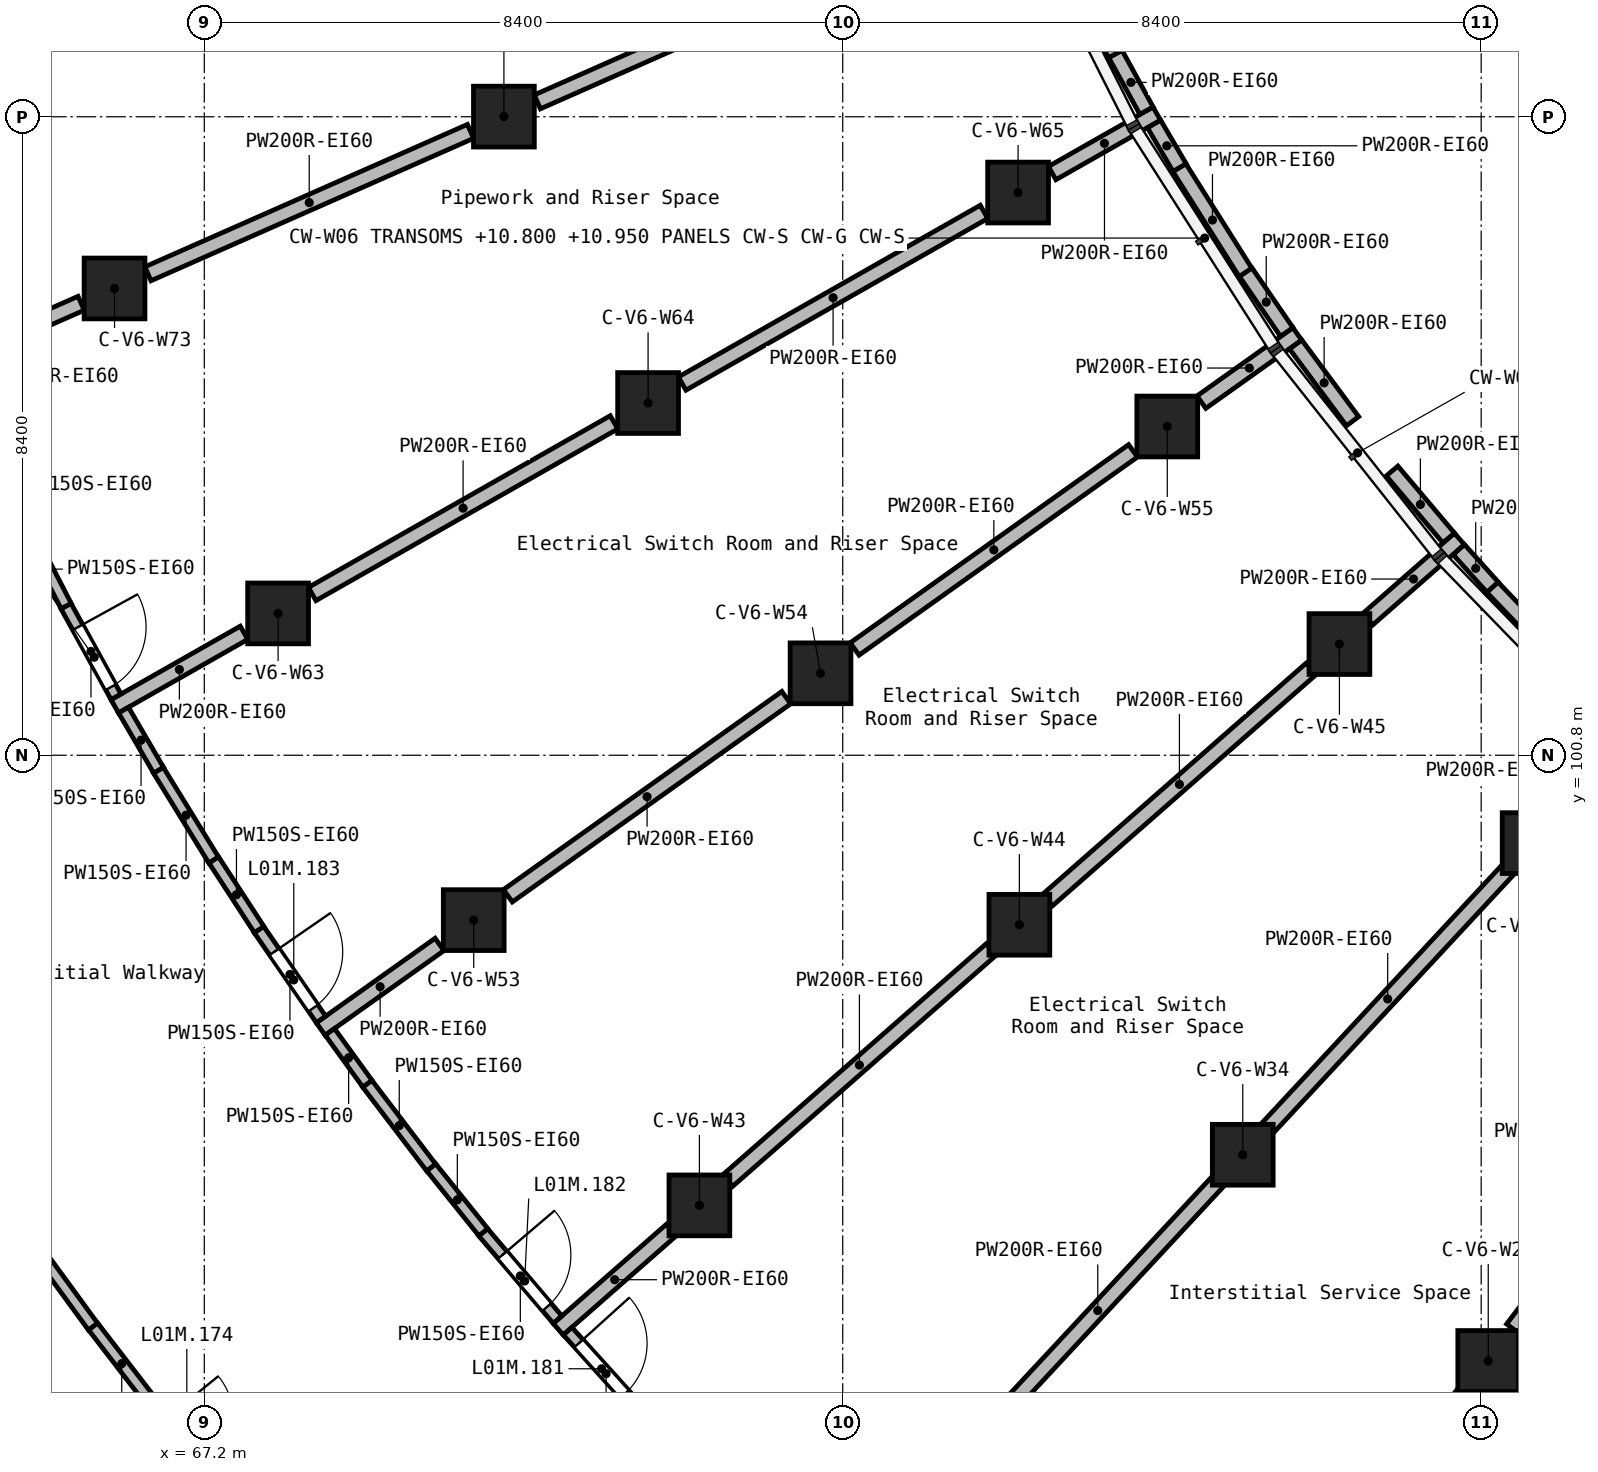
"""IFC4 building model, lengths in metres.
Left out: names, types, materials, properties, quantities, classifications, styles, units other than length and angle.
Written with IfcOpenShell. Run it as: python <this file> out.ifc"""

import sys

from ifc_helpers import new_model, si_unit, direction, frame, frame_2d, origin, origin_2d, place, context, subcontext, project, spatial, rectangle, extrude, element, fill, save


model = new_model("IFC4")
c1 = context("Model", 3, precision=1e-05, world=origin(), true_north=direction((0.0, 1.0)))
c2 = subcontext(c1, "Body", "Model", "MODEL_VIEW")
j1 = project(units=[si_unit("LENGTHUNIT", "METRE"), si_unit("PLANEANGLEUNIT", "RADIAN")], contexts=[c1])
p1 = place(None, origin())
s1 = spatial("IfcSite", under=j1, at=p1, CompositionType="ELEMENT")
p2 = place(p1, origin())
s2 = spatial("IfcBuilding", under=s1, at=p2, CompositionType="ELEMENT")
p3 = place(p2, frame((0.0, 0.0, 9.9)))
s3 = spatial("IfcBuildingStorey", under=s2, at=p3, CompositionType="ELEMENT", Elevation=9.9)
for number, where, z_axis, x_axis in (
    (1, (66.019, 106.941, 0.0), (0.0, 0.0, 1.0), (1.0, 0.0, 0.0)),
    (2, (68.171, 102.666, 0.0), (0.0, 0.0, 1.0), (1.0, 0.0, 0.0)),
    (3, (70.745, 98.631, 0.0), (0.0, 0.0, 1.0), (1.0, 0.0, 0.0)),
    (4, (71.142, 109.202, 0.0), (0.0, 0.0, 1.0), (1.0, 0.0, 0.0)),
    (5, (73.039, 105.434, 0.0), (0.0, 0.0, 1.0), (1.0, 0.0, 0.0)),
    (6, (73.714, 94.878, 0.0), (0.0, 0.0, 1.0), (1.0, 0.0, 0.0)),
    (7, (75.308, 101.878, 0.0), (0.0, 0.0, 1.0), (1.0, 0.0, 0.0)),
    (8, (77.907, 108.203, 0.0), (0.0, 0.0, 1.0), (1.0, 0.0, 0.0)),
    (9, (77.924, 98.57, 0.0), (0.0, 0.0, 1.0), (1.0, 0.0, 0.0)),
    (10, (79.87, 105.125, 0.0), (0.0, 0.0, 1.0), (1.0, 0.0, 0.0)),
    (11, (80.863, 95.544, 0.0), (0.0, 0.0, 1.0), (1.0, 0.0, 0.0)),
    (12, (82.135, 102.263, 0.0), (0.0, 0.0, 1.0), (1.0, 0.0, 0.0)),
    (13, (84.093, 92.831, 0.0), (0.0, 0.0, 1.0), (1.0, 0.0, 0.0)),
    (14, (84.677, 99.644, 0.0), (0.0, 0.0, 1.0), (1.0, 0.0, 0.0)),
):
    element("IfcColumn", number, at=place(p3, frame(where, z_axis=z_axis, x_axis=x_axis)), inside=s3, PredefinedType="COLUMN", context=c2, shape_type="SweptSolid", body=[
        extrude(rectangle(XDim=0.8, YDim=0.8, at=origin_2d()), origin(), (0.0, 0.0, 1.0), 2.7),
    ])
p4 = place(p3, frame((63.757, 105.942, 0.0), z_axis=(0.0, 0.0, 1.0), x_axis=(0.91480459559, 0.403896709429, 0.0)))
e15 = element("IfcWall", 15, at=p4, inside=s3, PredefinedType="SOLIDWALL", context=c2, shape_type="SweptSolid", body=[
    extrude(rectangle(XDim=1.992, YDim=0.2, at=frame_2d((0.996, 0.0))), origin(), (0.0, 0.0, 1.0), 2.45),
])
p5 = place(p3, frame((66.458, 107.134, 0.0), z_axis=(0.0, 0.0, 1.0), x_axis=(0.914820027479, 0.403861755213, 0.0)))
e16 = element("IfcWall", 16, at=p5, inside=s3, PredefinedType="SOLIDWALL", context=c2, shape_type="SweptSolid", body=[
    extrude(rectangle(XDim=4.639, YDim=0.2, at=frame_2d((2.32, 0.0))), origin(), (0.0, 0.0, 1.0), 2.45),
])
p6 = place(p3, frame((71.582, 109.396, 0.0), z_axis=(0.0, 0.0, 1.0), x_axis=(0.914834914902, 0.40382803082, 0.0)))
e17 = element("IfcWall", 17, at=p6, inside=s3, PredefinedType="SOLIDWALL", context=c2, shape_type="SweptSolid", body=[
    extrude(rectangle(XDim=4.64, YDim=0.2, at=frame_2d((2.32, 0.0))), origin(), (0.0, 0.0, 1.0), 2.45),
])
p7 = place(p3, frame((66.022, 101.444, 0.0), z_axis=(0.0, 0.0, 1.0), x_axis=(0.869270144925, 0.494337349532, 0.0)))
e18 = element("IfcWall", 18, at=p7, inside=s3, PredefinedType="SOLIDWALL", context=c2, shape_type="SweptSolid", body=[
    extrude(rectangle(XDim=1.957, YDim=0.2, at=frame_2d((0.979, 0.0))), origin(), (0.0, 0.0, 1.0), 2.45),
])
p8 = place(p3, frame((68.619, 102.921, 0.0), z_axis=(0.0, 0.0, 1.0), x_axis=(0.869273909114, 0.494330730315, 0.0)))
e19 = element("IfcWall", 19, at=p8, inside=s3, PredefinedType="SOLIDWALL", context=c2, shape_type="SweptSolid", body=[
    extrude(rectangle(XDim=4.568, YDim=0.2, at=frame_2d((2.284, 0.0))), origin(), (0.0, 0.0, 1.0), 2.45),
])
p9 = place(p3, frame((73.487, 105.69, 0.0), z_axis=(0.0, 0.0, 1.0), x_axis=(0.869250944646, 0.49437111084, 0.0)))
e20 = element("IfcWall", 20, at=p9, inside=s3, PredefinedType="SOLIDWALL", context=c2, shape_type="SweptSolid", body=[
    extrude(rectangle(XDim=4.569, YDim=0.2, at=frame_2d((2.284, 0.0))), origin(), (0.0, 0.0, 1.0), 2.45),
])
p10 = place(p3, frame((78.355, 108.458, 0.0), z_axis=(0.0, 0.0, 1.0), x_axis=(0.869218667817, 0.49442785876, 0.0)))
e21 = element("IfcWall", 21, at=p10, inside=s3, PredefinedType="SOLIDWALL", context=c2, shape_type="SweptSolid", body=[
    extrude(rectangle(XDim=1.583, YDim=0.2, at=frame_2d((0.792, 0.0))), origin(), (0.0, 0.0, 1.0), 2.45),
])
p11 = place(p3, frame((81.035, 88.792, 0.0), z_axis=(0.0, 0.0, 1.0), x_axis=(0.603552800748, 0.797323031594, 0.0)))
e22 = element("IfcWall", 22, at=p11, inside=s3, PredefinedType="SOLIDWALL", context=c2, shape_type="SweptSolid", body=[
    extrude(rectangle(XDim=4.533, YDim=0.2, at=frame_2d((2.267, 0.0))), origin(), (0.0, 0.0, 1.0), 2.45),
])
p12 = place(p3, frame((84.415, 93.257, 0.0), z_axis=(0.0, 0.0, 1.0), x_axis=(0.603553756077, 0.797322308434, 0.0)))
e23 = element("IfcWall", 23, at=p12, inside=s3, PredefinedType="SOLIDWALL", context=c2, shape_type="SweptSolid", body=[
    extrude(rectangle(XDim=4.532, YDim=0.2, at=frame_2d((2.266, 0.0))), origin(), (0.0, 0.0, 1.0), 2.45),
])
p13 = place(p3, frame((77.376, 91.797, 0.0), z_axis=(0.0, 0.0, 1.0), x_axis=(0.681189934363, 0.73210673629, 0.0)))
e24 = element("IfcWall", 24, at=p13, inside=s3, PredefinedType="SOLIDWALL", context=c2, shape_type="SweptSolid", body=[
    extrude(rectangle(XDim=4.637, YDim=0.2, at=frame_2d((2.318, 0.0))), origin(), (0.0, 0.0, 1.0), 2.45),
])
p14 = place(p3, frame((81.191, 95.897, 0.0), z_axis=(0.0, 0.0, 1.0), x_axis=(0.681180116782, 0.732115870952, 0.0)))
e25 = element("IfcWall", 25, at=p14, inside=s3, PredefinedType="SOLIDWALL", context=c2, shape_type="SweptSolid", body=[
    extrude(rectangle(XDim=4.635, YDim=0.2, at=frame_2d((2.317, 0.0))), origin(), (0.0, 0.0, 1.0), 2.45),
])
p15 = place(p3, frame((68.732, 97.198, 0.0), z_axis=(0.0, 0.0, 1.0), x_axis=(0.814746907165, 0.5798167618, 0.0)))
e26 = element("IfcWall", 26, at=p15, inside=s3, PredefinedType="SOLIDWALL", context=c2, shape_type="SweptSolid", body=[
    extrude(rectangle(XDim=1.918, YDim=0.2, at=frame_2d((0.959, 0.0))), origin(), (0.0, 0.0, 1.0), 2.45),
])
for number, where, z_axis, x_axis in (
    (27, (71.195, 98.951, 0.0), (0.0, 0.0, 1.0), (0.815, 0.58, 0.0)),
    (28, (75.757, 102.198, 0.0), (0.0, 0.0, 1.0), (0.815, 0.58, 0.0)),
):
    element("IfcWall", number, at=place(p3, frame(where, z_axis=z_axis, x_axis=x_axis)), inside=s3, PredefinedType="SOLIDWALL", context=c2, shape_type="SweptSolid", body=[
        extrude(rectangle(XDim=4.495, YDim=0.2, at=frame_2d((2.248, 0.0))), origin(), (0.0, 0.0, 1.0), 2.45),
    ])
p16 = place(p3, frame((80.319, 105.445, 0.0), z_axis=(0.0, 0.0, 1.0), x_axis=(0.81475502869, 0.579805349428, 0.0)))
e29 = element("IfcWall", 29, at=p16, inside=s3, PredefinedType="SOLIDWALL", context=c2, shape_type="SweptSolid", body=[
    extrude(rectangle(XDim=1.548, YDim=0.2, at=frame_2d((0.774, 0.0))), origin(), (0.0, 0.0, 1.0), 2.45),
])
p17 = place(p3, frame((71.857, 93.249, 0.0), z_axis=(0.0, 0.0, 1.0), x_axis=(0.751795639598, 0.659396175513, 0.0)))
e30 = element("IfcWall", 30, at=p17, inside=s3, PredefinedType="SOLIDWALL", context=c2, shape_type="SweptSolid", body=[
    extrude(rectangle(XDim=1.976, YDim=0.2, at=frame_2d((0.988, 0.0))), origin(), (0.0, 0.0, 1.0), 2.45),
])
p18 = place(p3, frame((74.087, 95.204, 0.0), z_axis=(0.0, 0.0, 1.0), x_axis=(0.751831429018, 0.659355368781, 0.0)))
e31 = element("IfcWall", 31, at=p18, inside=s3, PredefinedType="SOLIDWALL", context=c2, shape_type="SweptSolid", body=[
    extrude(rectangle(XDim=4.61, YDim=0.2, at=frame_2d((2.305, 0.0))), origin(), (0.0, 0.0, 1.0), 2.45),
])
p19 = place(p3, frame((78.296, 98.896, 0.0), z_axis=(0.0, 0.0, 1.0), x_axis=(0.751815287375, 0.659373773871, 0.0)))
e32 = element("IfcWall", 32, at=p19, inside=s3, PredefinedType="SOLIDWALL", context=c2, shape_type="SweptSolid", body=[
    extrude(rectangle(XDim=4.611, YDim=0.2, at=frame_2d((2.306, 0.0))), origin(), (0.0, 0.0, 1.0), 2.45),
])
p20 = place(p3, frame((82.507, 102.589, 0.0), z_axis=(0.0, 0.0, 1.0), x_axis=(0.751793531826, 0.659398578634, 0.0)))
e33 = element("IfcWall", 33, at=p20, inside=s3, PredefinedType="SOLIDWALL", context=c2, shape_type="SweptSolid", body=[
    extrude(rectangle(XDim=1.604, YDim=0.2, at=frame_2d((0.802, 0.0))), origin(), (0.0, 0.0, 1.0), 2.45),
])
p21 = place(p3, frame((78.408, 111.575, 0.0), z_axis=(0.0, 0.0, 1.0), x_axis=(0.447494222103, -0.89428682266, 0.0)))
e34 = element("IfcWall", 34, at=p21, inside=s3, PredefinedType="SOLIDWALL", context=c2, shape_type="SweptSolid", body=[
    extrude(rectangle(XDim=1.74, YDim=0.2, at=frame_2d((0.87, 0.0))), origin(), (0.0, 0.0, 1.0), 2.45),
])
p22 = place(p3, frame((80.028, 108.532, 0.0), z_axis=(0.0, 0.0, 1.0), x_axis=(0.534110896363, -0.84541442523, 0.0)))
e35 = element("IfcWall", 35, at=p22, inside=s3, PredefinedType="SOLIDWALL", context=c2, shape_type="SweptSolid", body=[
    extrude(rectangle(XDim=1.636, YDim=0.2, at=frame_2d((0.818, 0.0))), origin(), (0.0, 0.0, 1.0), 2.45),
])
p23 = place(p3, frame((81.559, 106.204, 0.0), z_axis=(0.0, 0.0, 1.0), x_axis=(0.596105693605, -0.802905973356, 0.0)))
e36 = element("IfcWall", 36, at=p23, inside=s3, PredefinedType="SOLIDWALL", context=c2, shape_type="SweptSolid", body=[
    extrude(rectangle(XDim=1.256, YDim=0.2, at=frame_2d((0.628, 0.0))), origin(), (0.0, 0.0, 1.0), 2.45),
])
p24 = place(p3, frame((82.828, 104.54, 0.0), z_axis=(0.0, 0.0, 1.0), x_axis=(0.645249445925, -0.76397195795, 0.0)))
e37 = element("IfcWall", 37, at=p24, inside=s3, PredefinedType="SOLIDWALL", context=c2, shape_type="SweptSolid", body=[
    extrude(rectangle(XDim=1.154, YDim=0.2, at=frame_2d((0.577, 0.0))), origin(), (0.0, 0.0, 1.0), 2.45),
])
p25 = place(p3, frame((84.146, 103.012, 0.0), z_axis=(0.0, 0.0, 1.0), x_axis=(0.691353330866, -0.722516831569, 0.0)))
e38 = element("IfcWall", 38, at=p25, inside=s3, PredefinedType="SOLIDWALL", context=c2, shape_type="SweptSolid", body=[
    extrude(rectangle(XDim=1.23, YDim=0.2, at=frame_2d((0.615, 0.0))), origin(), (0.0, 0.0, 1.0), 2.45),
])
p26 = place(p3, frame((80.903, 107.155, 0.0), z_axis=(0.0, 0.0, 1.0), x_axis=(0.565593097798, -0.824684453427, 0.0)))
e39 = element("IfcWall", 39, at=p26, inside=s3, PredefinedType="SOLIDWALL", context=c2, shape_type="SweptSolid", body=[
    extrude(rectangle(XDim=0.953, YDim=0.2, at=frame_2d((0.476, 0.0))), origin(), (0.0, 0.0, 1.0), 2.45),
])
p27 = place(p3, frame((79.188, 110.024, 0.0), z_axis=(0.0, 0.0, 1.0), x_axis=(0.481089632331, -0.876671412596, 0.0)))
e40 = element("IfcWall", 40, at=p27, inside=s3, PredefinedType="SOLIDWALL", context=c2, shape_type="SweptSolid", body=[
    extrude(rectangle(XDim=0.848, YDim=0.2, at=frame_2d((0.424, 0.0))), origin(), (0.0, 0.0, 1.0), 2.45),
])
for number, where, z_axis, x_axis in (
    (41, (83.706, 103.506, 0.0), (0.0, 0.0, 1.0), (0.669, -0.743, 0.0)),
    (42, (79.696, 109.104, 0.0), (0.0, 0.0, 1.0), (0.505, -0.863, 0.0)),
):
    element("IfcWall", number, at=place(p3, frame(where, z_axis=z_axis, x_axis=x_axis)), inside=s3, PredefinedType="SOLIDWALL", context=c2, shape_type="SweptSolid", body=[
        extrude(rectangle(XDim=0.664, YDim=0.2, at=frame_2d((0.332, 0.0))), origin(), (0.0, 0.0, 1.0), 2.45),
    ])
p28 = place(p3, frame((70.868, 94.525, 0.0), z_axis=(0.0, 0.0, 1.0), x_axis=(0.648178462951, -0.761488463581, 0.0)))
e43 = element("IfcWall", 43, at=p28, inside=s3, PredefinedType="PARTITIONING", context=c2, shape_type="SweptSolid", body=[
    extrude(rectangle(XDim=1.51, YDim=0.15, at=frame_2d((0.755, 0.0))), origin(), (0.0, 0.0, 1.0), 2.45),
])
p29 = place(p28, frame((0.393, 0.0, 0.0)))
e44 = element("IfcOpeningElement", 44, at=p29, cuts=e43, PredefinedType="OPENING", context=c2, shape_type="SweptSolid", body=[
    extrude(rectangle(XDim=0.9, YDim=2.1, at=frame_2d((0.45, 1.05))), frame((0.0, 0.085, 0.0), z_axis=(0.0, -1.0, 0.0), x_axis=(1.0, 0.0, 0.0)), (0.0, 0.0, 1.0), 0.17),
])
p30 = place(p3, frame((71.981, 93.223, 0.0), z_axis=(0.0, 0.0, 1.0), x_axis=(0.670358116646, -0.742037731822, 0.0)))
e45 = element("IfcWall", 45, at=p30, inside=s3, PredefinedType="PARTITIONING", context=c2, shape_type="SweptSolid", body=[
    extrude(rectangle(XDim=1.509, YDim=0.15, at=frame_2d((0.754, 0.0))), origin(), (0.0, 0.0, 1.0), 2.45),
])
p31 = place(p30, frame((0.216, 0.0, 0.0)))
e46 = element("IfcOpeningElement", 46, at=p31, cuts=e45, PredefinedType="OPENING", context=c2, shape_type="SweptSolid", body=[
    extrude(rectangle(XDim=0.9, YDim=2.1, at=frame_2d((0.45, 1.05))), frame((0.0, 0.085, 0.0), z_axis=(0.0, -1.0, 0.0), x_axis=(1.0, 0.0, 0.0)), (0.0, 0.0, 1.0), 0.17),
])
p32 = place(p3, frame((67.918, 98.508, 0.0), z_axis=(0.0, 0.0, 1.0), x_axis=(0.568459042743, -0.822711563504, 0.0)))
e47 = element("IfcWall", 47, at=p32, inside=s3, PredefinedType="PARTITIONING", context=c2, shape_type="SweptSolid", body=[
    extrude(rectangle(XDim=1.438, YDim=0.15, at=frame_2d((0.719, 0.0))), origin(), (0.0, 0.0, 1.0), 2.45),
])
p33 = place(p32, frame((0.357, 0.0, 0.0)))
e48 = element("IfcOpeningElement", 48, at=p33, cuts=e47, PredefinedType="OPENING", context=c2, shape_type="SweptSolid", body=[
    extrude(rectangle(XDim=0.9, YDim=2.1, at=frame_2d((0.45, 1.05))), frame((0.0, 0.085, 0.0), z_axis=(0.0, -1.0, 0.0), x_axis=(1.0, 0.0, 0.0)), (0.0, 0.0, 1.0), 0.17),
])
p34 = place(p3, frame((65.38, 102.764, 0.0), z_axis=(0.0, 0.0, 1.0), x_axis=(0.482660806307, -0.875807368121, 0.0)))
e49 = element("IfcWall", 49, at=p34, inside=s3, PredefinedType="PARTITIONING", context=c2, shape_type="SweptSolid", body=[
    extrude(rectangle(XDim=1.364, YDim=0.15, at=frame_2d((0.682, 0.0))), origin(), (0.0, 0.0, 1.0), 2.45),
])
p35 = place(p34, frame((0.32, 0.0, 0.0)))
e50 = element("IfcOpeningElement", 50, at=p35, cuts=e49, PredefinedType="OPENING", context=c2, shape_type="SweptSolid", body=[
    extrude(rectangle(XDim=0.9, YDim=2.1, at=frame_2d((0.45, 1.05))), frame((0.0, 0.085, 0.0), z_axis=(0.0, -1.0, 0.0), x_axis=(1.0, 0.0, 0.0)), (0.0, 0.0, 1.0), 0.17),
])
p36 = place(p3, frame((64.939, 94.374, 0.0), z_axis=(0.0, 0.0, 1.0), x_axis=(0.589962289841, -0.807430799862, 0.0)))
e51 = element("IfcWall", 51, at=p36, inside=s3, PredefinedType="PARTITIONING", context=c2, shape_type="SweptSolid", body=[
    extrude(rectangle(XDim=1.353, YDim=0.15, at=frame_2d((0.676, 0.0))), origin(), (0.0, 0.0, 1.0), 2.45),
])
p37 = place(p3, frame((65.738, 93.284, 0.0), z_axis=(0.0, 0.0, 1.0), x_axis=(0.610437971513, -0.792064064919, 0.0)))
e52 = element("IfcWall", 52, at=p37, inside=s3, PredefinedType="PARTITIONING", context=c2, shape_type="SweptSolid", body=[
    extrude(rectangle(XDim=1.233, YDim=0.15, at=frame_2d((0.616, 0.0))), origin(), (0.0, 0.0, 1.0), 2.45),
])
p38 = place(p3, frame((69.344, 96.479, 0.0), z_axis=(0.0, 0.0, 1.0), x_axis=(0.606556461902, -0.795040413139, 0.0)))
e53 = element("IfcWall", 53, at=p38, inside=s3, PredefinedType="PARTITIONING", context=c2, shape_type="SweptSolid", body=[
    extrude(rectangle(XDim=1.39, YDim=0.15, at=frame_2d((0.695, 0.0))), origin(), (0.0, 0.0, 1.0), 2.45),
])
p39 = place(p3, frame((66.596, 100.604, 0.0), z_axis=(0.0, 0.0, 1.0), x_axis=(0.524097425664, -0.851658316705, 0.0)))
e54 = element("IfcWall", 54, at=p39, inside=s3, PredefinedType="PARTITIONING", context=c2, shape_type="SweptSolid", body=[
    extrude(rectangle(XDim=1.39, YDim=0.15, at=frame_2d((0.695, 0.0))), origin(), (0.0, 0.0, 1.0), 2.45),
])
p40 = place(p3, frame((70.187, 95.377, 0.0), z_axis=(0.0, 0.0, 1.0), x_axis=(0.626328090187, -0.779559570169, 0.0)))
e55 = element("IfcWall", 55, at=p40, inside=s3, PredefinedType="PARTITIONING", context=c2, shape_type="SweptSolid", body=[
    extrude(rectangle(XDim=1.093, YDim=0.15, at=frame_2d((0.546, 0.0))), origin(), (0.0, 0.0, 1.0), 2.45),
])
for number, where, z_axis, x_axis in (
    (56, (64.882, 103.734, 0.0), (0.0, 0.0, 1.0), (0.459, -0.889, 0.0)),
    (57, (67.325, 99.423, 0.0), (0.0, 0.0, 1.0), (0.546, -0.838, 0.0)),
):
    element("IfcWall", number, at=place(p3, frame(where, z_axis=z_axis, x_axis=x_axis)), inside=s3, PredefinedType="PARTITIONING", context=c2, shape_type="SweptSolid", body=[
        extrude(rectangle(XDim=1.093, YDim=0.15, at=frame_2d((0.546, 0.0))), origin(), (0.0, 0.0, 1.0), 2.45),
    ])
p41 = place(p3, frame((66.138, 101.394, 0.0), z_axis=(0.0, 0.0, 1.0), x_axis=(0.503306768909, -0.864107803674, 0.0)))
e58 = element("IfcWall", 58, at=p41, inside=s3, PredefinedType="PARTITIONING", context=c2, shape_type="SweptSolid", body=[
    extrude(rectangle(XDim=0.915, YDim=0.15, at=frame_2d((0.458, 0.0))), origin(), (0.0, 0.0, 1.0), 2.45),
])
p42 = place(p3, frame((68.852, 97.16, 0.0), z_axis=(0.0, 0.0, 1.0), x_axis=(0.587015119912, -0.809575968637, 0.0)))
e59 = element("IfcWall", 59, at=p42, inside=s3, PredefinedType="PARTITIONING", context=c2, shape_type="SweptSolid", body=[
    extrude(rectangle(XDim=0.841, YDim=0.15, at=frame_2d((0.421, 0.0))), origin(), (0.0, 0.0, 1.0), 2.45),
])
p43 = place(p31, origin())
e60 = element("IfcDoor", 60, at=p43, inside=s3, OperationType="SINGLE_SWING_LEFT", PredefinedType="DOOR", context=c2, shape_type="SweptSolid", body=[
    extrude(rectangle(XDim=0.9, YDim=2.1, at=frame_2d((0.45, 1.05))), frame((0.0, 0.025, 0.0), z_axis=(0.0, -1.0, 0.0), x_axis=(1.0, 0.0, 0.0)), (0.0, 0.0, 1.0), 0.05),
])
fill(e46, e60)
p44 = place(p29, origin())
e61 = element("IfcDoor", 61, at=p44, inside=s3, OperationType="SINGLE_SWING_RIGHT", PredefinedType="DOOR", context=c2, shape_type="SweptSolid", body=[
    extrude(rectangle(XDim=0.9, YDim=2.1, at=frame_2d((0.45, 1.05))), frame((0.0, 0.025, 0.0), z_axis=(0.0, -1.0, 0.0), x_axis=(1.0, 0.0, 0.0)), (0.0, 0.0, 1.0), 0.05),
])
fill(e44, e61)
p45 = place(p33, origin())
e62 = element("IfcDoor", 62, at=p45, inside=s3, OperationType="SINGLE_SWING_RIGHT", PredefinedType="DOOR", context=c2, shape_type="SweptSolid", body=[
    extrude(rectangle(XDim=0.9, YDim=2.1, at=frame_2d((0.45, 1.05))), frame((0.0, 0.025, 0.0), z_axis=(0.0, -1.0, 0.0), x_axis=(1.0, 0.0, 0.0)), (0.0, 0.0, 1.0), 0.05),
])
fill(e48, e62)
p46 = place(p35, origin())
e63 = element("IfcDoor", 63, at=p46, inside=s3, OperationType="SINGLE_SWING_RIGHT", PredefinedType="DOOR", context=c2, shape_type="SweptSolid", body=[
    extrude(rectangle(XDim=0.9, YDim=2.1, at=frame_2d((0.45, 1.05))), frame((0.0, 0.025, 0.0), z_axis=(0.0, -1.0, 0.0), x_axis=(1.0, 0.0, 0.0)), (0.0, 0.0, 1.0), 0.05),
])
fill(e50, e63)
save(model, sys.argv[1])
